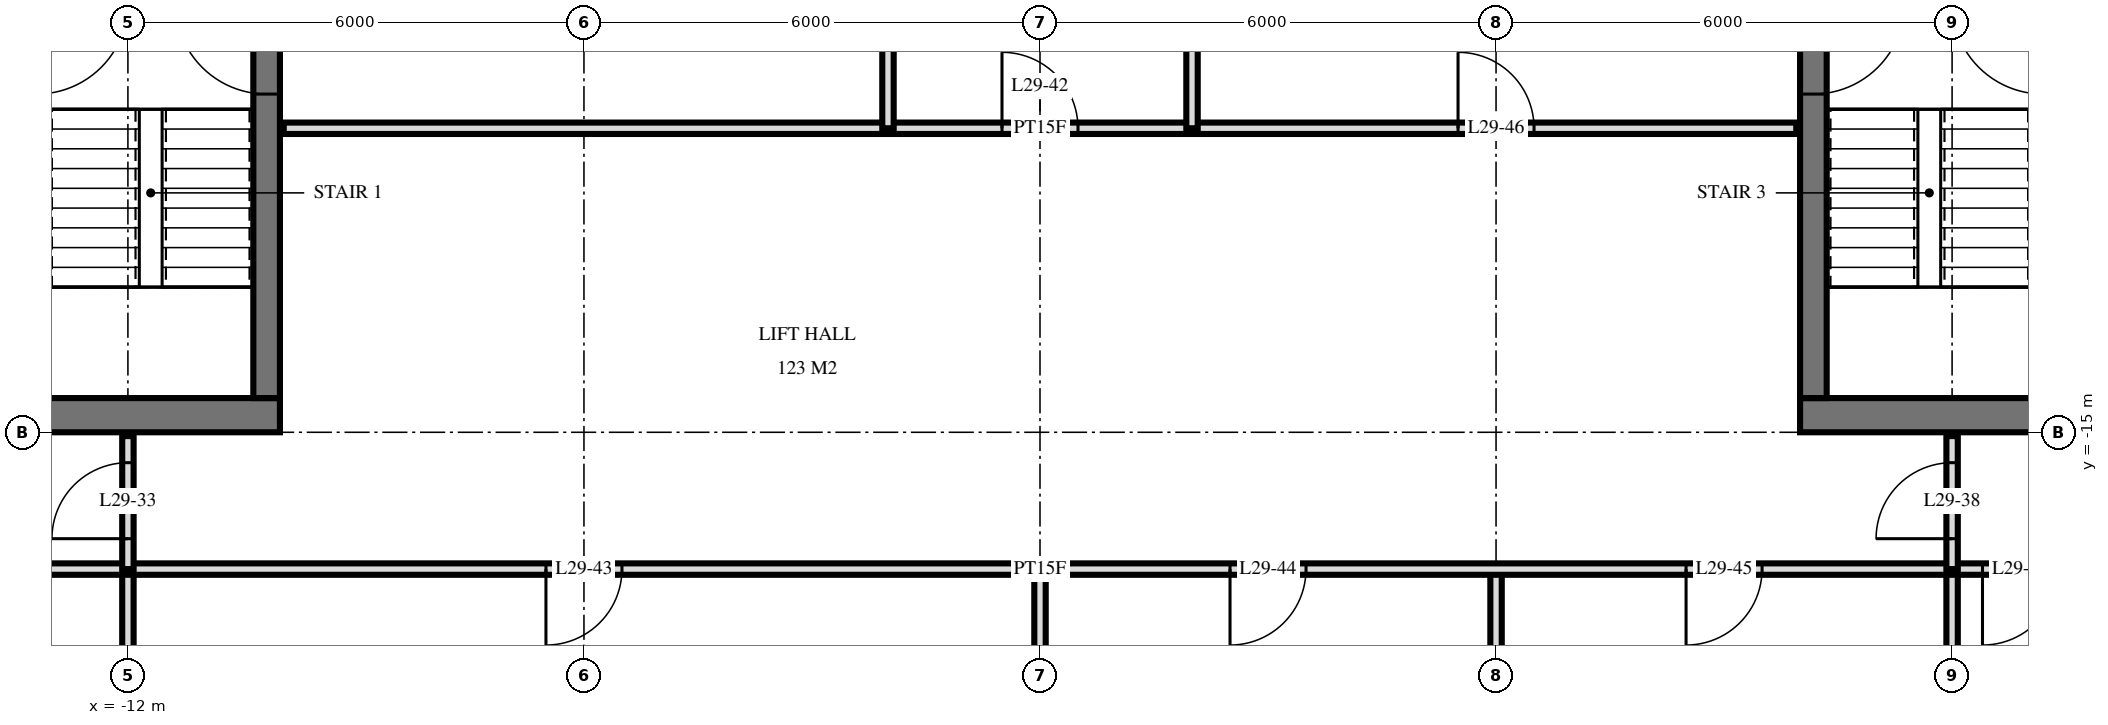
"""IFC4 building model, lengths in metres.
Left out: names, types, materials, properties, quantities, classifications, styles, units other than length and angle.
Written with IfcOpenShell. Run it as: python <this file> out.ifc"""

import sys

from ifc_helpers import new_model, si_unit, direction, frame, frame_2d, origin, place, context, subcontext, project, spatial, rectangle, extrude, element, fill, save


model = new_model("IFC4")
c1 = context("Model", 3, precision=1e-05, world=origin(), true_north=direction((0.0, 1.0)))
c2 = subcontext(c1, "Body", "Model", "MODEL_VIEW")
j1 = project(units=[si_unit("LENGTHUNIT", "METRE"), si_unit("PLANEANGLEUNIT", "RADIAN")], contexts=[c1])
p1 = place(None, origin())
s1 = spatial("IfcSite", under=j1, at=p1, CompositionType="ELEMENT")
p2 = place(p1, origin())
s2 = spatial("IfcBuilding", under=s1, at=p2, CompositionType="ELEMENT")
p3 = place(p2, frame((0.0, 0.0, 116.4)))
s3 = spatial("IfcBuildingStorey", under=s2, at=p3, CompositionType="ELEMENT", Elevation=116.4)
p4 = place(p3, frame((-24.5, -14.775, 0.0), z_axis=(0.0, 0.0, 1.0), x_axis=(1.0, 0.0, 0.0)))
e1 = element("IfcWall", 1, at=p4, inside=s3, PredefinedType="SHEAR", context=c2, shape_type="SweptSolid", body=[
    extrude(rectangle(XDim=14.5, YDim=0.45, at=frame_2d((7.25, 0.0))), origin(), (0.0, 0.0, 1.0), 3.6),
])
p5 = place(p4, frame((6.2, 0.0, 0.0)))
e2 = element("IfcOpeningElement", 2, at=p5, cuts=e1, PredefinedType="OPENING", context=c2, shape_type="SweptSolid", body=[
    extrude(rectangle(XDim=1.2, YDim=2.1, at=frame_2d((0.6, 1.05))), frame((0.0, 0.235, 0.0), z_axis=(0.0, -1.0, 0.0), x_axis=(1.0, 0.0, 0.0)), (0.0, 0.0, 1.0), 0.47),
])
p6 = place(p4, frame((9.25, 0.0, 0.0)))
e3 = element("IfcOpeningElement", 3, at=p6, cuts=e1, PredefinedType="OPENING", context=c2, shape_type="SweptSolid", body=[
    extrude(rectangle(XDim=1.1, YDim=2.1, at=frame_2d((0.55, 1.05))), frame((0.0, 0.235, 0.0), z_axis=(0.0, -1.0, 0.0), x_axis=(1.0, 0.0, 0.0)), (0.0, 0.0, 1.0), 0.47),
])
p7 = place(p4, frame((3.5, 0.0, 0.0)))
e4 = element("IfcOpeningElement", 4, at=p7, cuts=e1, PredefinedType="OPENING", context=c2, shape_type="SweptSolid", body=[
    extrude(rectangle(XDim=0.9, YDim=2.1, at=frame_2d((0.45, 1.05))), frame((0.0, 0.235, 0.0), z_axis=(0.0, -1.0, 0.0), x_axis=(1.0, 0.0, 0.0)), (0.0, 0.0, 1.0), 0.47),
])
p8 = place(p4, frame((1.05, 0.0, 0.0)))
e5 = element("IfcOpeningElement", 5, at=p8, cuts=e1, PredefinedType="OPENING", context=c2, shape_type="SweptSolid", body=[
    extrude(rectangle(XDim=1.0, YDim=2.1, at=frame_2d((0.5, 1.05))), frame((0.0, 0.235, 0.0), z_axis=(0.0, -1.0, 0.0), x_axis=(1.0, 0.0, 0.0)), (0.0, 0.0, 1.0), 0.47),
])
p9 = place(p3, frame((-10.175, -14.55, 0.0), z_axis=(0.0, 0.0, 1.0), x_axis=(0.0, 1.0, 0.0)))
e6 = element("IfcWall", 6, at=p9, inside=s3, PredefinedType="SHEAR", context=c2, shape_type="SweptSolid", body=[
    extrude(rectangle(XDim=14.1, YDim=0.35, at=frame_2d((7.05, 0.0))), origin(), (0.0, 0.0, 1.0), 3.6),
])
p10 = place(p9, frame((8.4, 0.0, 0.0)))
e7 = element("IfcOpeningElement", 7, at=p10, cuts=e6, PredefinedType="OPENING", context=c2, shape_type="SweptSolid", body=[
    extrude(rectangle(XDim=1.4, YDim=2.4, at=frame_2d((0.7, 1.2))), frame((0.0, 0.185, 0.0), z_axis=(0.0, -1.0, 0.0), x_axis=(1.0, 0.0, 0.0)), (0.0, 0.0, 1.0), 0.37),
])
p11 = place(p9, frame((10.0, 0.0, 0.0)))
e8 = element("IfcOpeningElement", 8, at=p11, cuts=e6, PredefinedType="OPENING", context=c2, shape_type="SweptSolid", body=[
    extrude(rectangle(XDim=1.4, YDim=2.4, at=frame_2d((0.7, 1.2))), frame((0.0, 0.185, 0.0), z_axis=(0.0, -1.0, 0.0), x_axis=(1.0, 0.0, 0.0)), (0.0, 0.0, 1.0), 0.37),
])
p12 = place(p9, frame((4.0, 0.0, 0.0)))
e9 = element("IfcOpeningElement", 9, at=p12, cuts=e6, PredefinedType="OPENING", context=c2, shape_type="SweptSolid", body=[
    extrude(rectangle(XDim=1.2, YDim=2.1, at=frame_2d((0.6, 1.05))), frame((0.0, 0.185, 0.0), z_axis=(0.0, -1.0, 0.0), x_axis=(1.0, 0.0, 0.0)), (0.0, 0.0, 1.0), 0.37),
])
p13 = place(p3, frame((10.0, -14.775, 0.0), z_axis=(0.0, 0.0, 1.0), x_axis=(1.0, 0.0, 0.0)))
e10 = element("IfcWall", 10, at=p13, inside=s3, PredefinedType="SHEAR", context=c2, shape_type="SweptSolid", body=[
    extrude(rectangle(XDim=14.5, YDim=0.45, at=frame_2d((7.25, 0.0))), origin(), (0.0, 0.0, 1.0), 3.6),
])
p14 = place(p13, frame((7.1, 0.0, 0.0)))
e11 = element("IfcOpeningElement", 11, at=p14, cuts=e10, PredefinedType="OPENING", context=c2, shape_type="SweptSolid", body=[
    extrude(rectangle(XDim=1.2, YDim=2.1, at=frame_2d((0.6, 1.05))), frame((0.0, 0.235, 0.0), z_axis=(0.0, -1.0, 0.0), x_axis=(1.0, 0.0, 0.0)), (0.0, 0.0, 1.0), 0.47),
])
p15 = place(p13, frame((4.15, 0.0, 0.0)))
e12 = element("IfcOpeningElement", 12, at=p15, cuts=e10, PredefinedType="OPENING", context=c2, shape_type="SweptSolid", body=[
    extrude(rectangle(XDim=1.1, YDim=2.1, at=frame_2d((0.55, 1.05))), frame((0.0, 0.235, 0.0), z_axis=(0.0, -1.0, 0.0), x_axis=(1.0, 0.0, 0.0)), (0.0, 0.0, 1.0), 0.47),
])
p16 = place(p13, frame((10.1, 0.0, 0.0)))
e13 = element("IfcOpeningElement", 13, at=p16, cuts=e10, PredefinedType="OPENING", context=c2, shape_type="SweptSolid", body=[
    extrude(rectangle(XDim=0.9, YDim=2.1, at=frame_2d((0.45, 1.05))), frame((0.0, 0.235, 0.0), z_axis=(0.0, -1.0, 0.0), x_axis=(1.0, 0.0, 0.0)), (0.0, 0.0, 1.0), 0.47),
])
p17 = place(p13, frame((12.45, 0.0, 0.0)))
e14 = element("IfcOpeningElement", 14, at=p17, cuts=e10, PredefinedType="OPENING", context=c2, shape_type="SweptSolid", body=[
    extrude(rectangle(XDim=1.0, YDim=2.1, at=frame_2d((0.5, 1.05))), frame((0.0, 0.235, 0.0), z_axis=(0.0, -1.0, 0.0), x_axis=(1.0, 0.0, 0.0)), (0.0, 0.0, 1.0), 0.47),
])
p18 = place(p3, frame((10.175, -14.55, 0.0), z_axis=(0.0, 0.0, 1.0), x_axis=(0.0, 1.0, 0.0)))
e15 = element("IfcWall", 15, at=p18, inside=s3, PredefinedType="SHEAR", context=c2, shape_type="SweptSolid", body=[
    extrude(rectangle(XDim=14.1, YDim=0.35, at=frame_2d((7.05, 0.0))), origin(), (0.0, 0.0, 1.0), 3.6),
])
p19 = place(p18, frame((8.4, 0.0, 0.0)))
e16 = element("IfcOpeningElement", 16, at=p19, cuts=e15, PredefinedType="OPENING", context=c2, shape_type="SweptSolid", body=[
    extrude(rectangle(XDim=1.4, YDim=2.4, at=frame_2d((0.7, 1.2))), frame((0.0, 0.185, 0.0), z_axis=(0.0, -1.0, 0.0), x_axis=(1.0, 0.0, 0.0)), (0.0, 0.0, 1.0), 0.37),
])
p20 = place(p18, frame((10.0, 0.0, 0.0)))
e17 = element("IfcOpeningElement", 17, at=p20, cuts=e15, PredefinedType="OPENING", context=c2, shape_type="SweptSolid", body=[
    extrude(rectangle(XDim=1.4, YDim=2.4, at=frame_2d((0.7, 1.2))), frame((0.0, 0.185, 0.0), z_axis=(0.0, -1.0, 0.0), x_axis=(1.0, 0.0, 0.0)), (0.0, 0.0, 1.0), 0.37),
])
p21 = place(p18, frame((4.0, 0.0, 0.0)))
e18 = element("IfcOpeningElement", 18, at=p21, cuts=e15, PredefinedType="OPENING", context=c2, shape_type="SweptSolid", body=[
    extrude(rectangle(XDim=1.2, YDim=2.1, at=frame_2d((0.6, 1.05))), frame((0.0, 0.185, 0.0), z_axis=(0.0, -1.0, 0.0), x_axis=(1.0, 0.0, 0.0)), (0.0, 0.0, 1.0), 0.37),
])
p22 = place(p3, frame((12.0, -16.8, 0.0), z_axis=(0.0, 0.0, 1.0), x_axis=(0.0, 1.0, 0.0)))
e19 = element("IfcWall", 19, at=p22, inside=s3, PredefinedType="PARTITIONING", context=c2, shape_type="SweptSolid", body=[
    extrude(rectangle(XDim=1.75, YDim=0.15, at=frame_2d((0.875, 0.0))), origin(), (0.0, 0.0, 1.0), 3.32),
])
p23 = place(p22, frame((0.4, 0.0, 0.0)))
e20 = element("IfcOpeningElement", 20, at=p23, cuts=e19, PredefinedType="OPENING", context=c2, shape_type="SweptSolid", body=[
    extrude(rectangle(XDim=1.0, YDim=2.1, at=frame_2d((0.5, 1.05))), frame((0.0, 0.085, 0.0), z_axis=(0.0, -1.0, 0.0), x_axis=(1.0, 0.0, 0.0)), (0.0, 0.0, 1.0), 0.17),
])
for number, where, z_axis, x_axis in (
    (21, (12.0, -33.62, 0.0), (0.0, 0.0, 1.0), (0.0, 1.0, 0.0)),
    (22, (6.0, -33.62, 0.0), (0.0, 0.0, 1.0), (0.0, 1.0, 0.0)),
):
    element("IfcWall", number, at=place(p3, frame(where, z_axis=z_axis, x_axis=x_axis)), inside=s3, PredefinedType="PARTITIONING", context=c2, shape_type="SweptSolid", body=[
        extrude(rectangle(XDim=16.82, YDim=0.15, at=frame_2d((8.41, 0.0))), origin(), (0.0, 0.0, 1.0), 3.32),
    ])
p24 = place(p3, frame((2.0, -11.0, 0.0), z_axis=(0.0, 0.0, 1.0), x_axis=(0.0, 1.0, 0.0)))
e23 = element("IfcWall", 23, at=p24, inside=s3, PredefinedType="PARTITIONING", context=c2, shape_type="SweptSolid", body=[
    extrude(rectangle(XDim=4.0, YDim=0.15, at=frame_2d((2.0, 0.0))), origin(), (0.0, 0.0, 1.0), 3.32),
])
p25 = place(p3, frame((0.0, -33.62, 0.0), z_axis=(0.0, 0.0, 1.0), x_axis=(0.0, 1.0, 0.0)))
e24 = element("IfcWall", 24, at=p25, inside=s3, PredefinedType="PARTITIONING", context=c2, shape_type="SweptSolid", body=[
    extrude(rectangle(XDim=16.82, YDim=0.15, at=frame_2d((8.41, 0.0))), origin(), (0.0, 0.0, 1.0), 3.32),
])
p26 = place(p3, frame((-2.0, -11.0, 0.0), z_axis=(0.0, 0.0, 1.0), x_axis=(0.0, 1.0, 0.0)))
e25 = element("IfcWall", 25, at=p26, inside=s3, PredefinedType="PARTITIONING", context=c2, shape_type="SweptSolid", body=[
    extrude(rectangle(XDim=4.0, YDim=0.15, at=frame_2d((2.0, 0.0))), origin(), (0.0, 0.0, 1.0), 3.32),
])
p27 = place(p3, frame((-12.0, -16.8, 0.0), z_axis=(0.0, 0.0, 1.0), x_axis=(0.0, 1.0, 0.0)))
e26 = element("IfcWall", 26, at=p27, inside=s3, PredefinedType="PARTITIONING", context=c2, shape_type="SweptSolid", body=[
    extrude(rectangle(XDim=1.75, YDim=0.15, at=frame_2d((0.875, 0.0))), origin(), (0.0, 0.0, 1.0), 3.32),
])
p28 = place(p27, frame((0.4, 0.0, 0.0)))
e27 = element("IfcOpeningElement", 27, at=p28, cuts=e26, PredefinedType="OPENING", context=c2, shape_type="SweptSolid", body=[
    extrude(rectangle(XDim=1.0, YDim=2.1, at=frame_2d((0.5, 1.05))), frame((0.0, 0.085, 0.0), z_axis=(0.0, -1.0, 0.0), x_axis=(1.0, 0.0, 0.0)), (0.0, 0.0, 1.0), 0.17),
])
p29 = place(p3, frame((-12.0, -33.62, 0.0), z_axis=(0.0, 0.0, 1.0), x_axis=(0.0, 1.0, 0.0)))
e28 = element("IfcWall", 28, at=p29, inside=s3, PredefinedType="PARTITIONING", context=c2, shape_type="SweptSolid", body=[
    extrude(rectangle(XDim=16.82, YDim=0.15, at=frame_2d((8.41, 0.0))), origin(), (0.0, 0.0, 1.0), 3.32),
])
p30 = place(p3, frame((-28.02, -16.8, 0.0), z_axis=(0.0, 0.0, 1.0), x_axis=(1.0, 0.0, 0.0)))
e29 = element("IfcWall", 29, at=p30, inside=s3, PredefinedType="PARTITIONING", context=c2, shape_type="SweptSolid", body=[
    extrude(rectangle(XDim=56.04, YDim=0.15, at=frame_2d((28.02, 0.0))), origin(), (0.0, 0.0, 1.0), 3.32),
])
p31 = place(p30, frame((13.17, 0.0, 0.0)))
e30 = element("IfcOpeningElement", 30, at=p31, cuts=e29, PredefinedType="OPENING", context=c2, shape_type="SweptSolid", body=[
    extrude(rectangle(XDim=1.0, YDim=2.1, at=frame_2d((0.5, 1.05))), frame((0.0, 0.085, 0.0), z_axis=(0.0, -1.0, 0.0), x_axis=(1.0, 0.0, 0.0)), (0.0, 0.0, 1.0), 0.17),
])
p32 = place(p30, frame((11.87, 0.0, 0.0)))
e31 = element("IfcOpeningElement", 31, at=p32, cuts=e29, PredefinedType="OPENING", context=c2, shape_type="SweptSolid", body=[
    extrude(rectangle(XDim=1.0, YDim=2.1, at=frame_2d((0.5, 1.05))), frame((0.0, 0.085, 0.0), z_axis=(0.0, -1.0, 0.0), x_axis=(1.0, 0.0, 0.0)), (0.0, 0.0, 1.0), 0.17),
])
p33 = place(p30, frame((8.32, 0.0, 0.0)))
e32 = element("IfcOpeningElement", 32, at=p33, cuts=e29, PredefinedType="OPENING", context=c2, shape_type="SweptSolid", body=[
    extrude(rectangle(XDim=1.0, YDim=2.1, at=frame_2d((0.5, 1.05))), frame((0.0, 0.085, 0.0), z_axis=(0.0, -1.0, 0.0), x_axis=(1.0, 0.0, 0.0)), (0.0, 0.0, 1.0), 0.17),
])
p34 = place(p30, frame((40.42, 0.0, 0.0)))
e33 = element("IfcOpeningElement", 33, at=p34, cuts=e29, PredefinedType="OPENING", context=c2, shape_type="SweptSolid", body=[
    extrude(rectangle(XDim=1.0, YDim=2.1, at=frame_2d((0.5, 1.05))), frame((0.0, 0.085, 0.0), z_axis=(0.0, -1.0, 0.0), x_axis=(1.0, 0.0, 0.0)), (0.0, 0.0, 1.0), 0.17),
])
p35 = place(p30, frame((46.72, 0.0, 0.0)))
e34 = element("IfcOpeningElement", 34, at=p35, cuts=e29, PredefinedType="OPENING", context=c2, shape_type="SweptSolid", body=[
    extrude(rectangle(XDim=1.0, YDim=2.1, at=frame_2d((0.5, 1.05))), frame((0.0, 0.085, 0.0), z_axis=(0.0, -1.0, 0.0), x_axis=(1.0, 0.0, 0.0)), (0.0, 0.0, 1.0), 0.17),
])
p36 = place(p30, frame((21.52, 0.0, 0.0)))
e35 = element("IfcOpeningElement", 35, at=p36, cuts=e29, PredefinedType="OPENING", context=c2, shape_type="SweptSolid", body=[
    extrude(rectangle(XDim=1.0, YDim=2.1, at=frame_2d((0.5, 1.05))), frame((0.0, 0.085, 0.0), z_axis=(0.0, -1.0, 0.0), x_axis=(1.0, 0.0, 0.0)), (0.0, 0.0, 1.0), 0.17),
])
p37 = place(p30, frame((30.52, 0.0, 0.0)))
e36 = element("IfcOpeningElement", 36, at=p37, cuts=e29, PredefinedType="OPENING", context=c2, shape_type="SweptSolid", body=[
    extrude(rectangle(XDim=1.0, YDim=2.1, at=frame_2d((0.5, 1.05))), frame((0.0, 0.085, 0.0), z_axis=(0.0, -1.0, 0.0), x_axis=(1.0, 0.0, 0.0)), (0.0, 0.0, 1.0), 0.17),
])
p38 = place(p30, frame((36.52, 0.0, 0.0)))
e37 = element("IfcOpeningElement", 37, at=p38, cuts=e29, PredefinedType="OPENING", context=c2, shape_type="SweptSolid", body=[
    extrude(rectangle(XDim=1.0, YDim=2.1, at=frame_2d((0.5, 1.05))), frame((0.0, 0.085, 0.0), z_axis=(0.0, -1.0, 0.0), x_axis=(1.0, 0.0, 0.0)), (0.0, 0.0, 1.0), 0.17),
])
p39 = place(p3, frame((-9.95, -11.0, 0.0), z_axis=(0.0, 0.0, 1.0), x_axis=(1.0, 0.0, 0.0)))
e38 = element("IfcWall", 38, at=p39, inside=s3, PredefinedType="PARTITIONING", context=c2, shape_type="SweptSolid", body=[
    extrude(rectangle(XDim=19.9, YDim=0.15, at=frame_2d((9.95, 0.0))), origin(), (0.0, 0.0, 1.0), 3.32),
])
p40 = place(p39, frame((9.45, 0.0, 0.0)))
e39 = element("IfcOpeningElement", 39, at=p40, cuts=e38, PredefinedType="OPENING", context=c2, shape_type="SweptSolid", body=[
    extrude(rectangle(XDim=1.0, YDim=2.1, at=frame_2d((0.5, 1.05))), frame((0.0, 0.085, 0.0), z_axis=(0.0, -1.0, 0.0), x_axis=(1.0, 0.0, 0.0)), (0.0, 0.0, 1.0), 0.17),
])
p41 = place(p39, frame((15.45, 0.0, 0.0)))
e40 = element("IfcOpeningElement", 40, at=p41, cuts=e38, PredefinedType="OPENING", context=c2, shape_type="SweptSolid", body=[
    extrude(rectangle(XDim=1.0, YDim=2.1, at=frame_2d((0.5, 1.05))), frame((0.0, 0.085, 0.0), z_axis=(0.0, -1.0, 0.0), x_axis=(1.0, 0.0, 0.0)), (0.0, 0.0, 1.0), 0.17),
])
p42 = place(p12, origin())
e41 = element("IfcDoor", 41, at=p42, inside=s3, OperationType="SINGLE_SWING_LEFT", PredefinedType="DOOR", context=c2, shape_type="SweptSolid", body=[
    extrude(rectangle(XDim=1.2, YDim=2.1, at=frame_2d((0.6, 1.05))), frame((0.0, 0.025, 0.0), z_axis=(0.0, -1.0, 0.0), x_axis=(1.0, 0.0, 0.0)), (0.0, 0.0, 1.0), 0.05),
])
fill(e9, e41)
p43 = place(p21, frame((0.6, 0.0, 0.0), z_axis=(0.0, 0.0, 1.0), x_axis=(-1.0, 0.0, 0.0)))
e42 = element("IfcDoor", 42, at=p43, inside=s3, OperationType="SINGLE_SWING_RIGHT", PredefinedType="DOOR", context=c2, shape_type="SweptSolid", body=[
    extrude(rectangle(XDim=1.2, YDim=2.1, at=frame_2d((0.0, 1.05))), frame((0.0, -0.025, 0.0), z_axis=(0.0, 1.0, 0.0), x_axis=(-1.0, 0.0, 0.0)), (0.0, 0.0, 1.0), 0.05),
])
fill(e18, e42)
p44 = place(p28, origin())
e43 = element("IfcDoor", 43, at=p44, inside=s3, OperationType="SINGLE_SWING_RIGHT", PredefinedType="DOOR", context=c2, shape_type="SweptSolid", body=[
    extrude(rectangle(XDim=1.0, YDim=2.1, at=frame_2d((0.5, 1.05))), frame((0.0, 0.025, 0.0), z_axis=(0.0, -1.0, 0.0), x_axis=(1.0, 0.0, 0.0)), (0.0, 0.0, 1.0), 0.05),
])
fill(e27, e43)
p45 = place(p23, origin())
e44 = element("IfcDoor", 44, at=p45, inside=s3, OperationType="SINGLE_SWING_RIGHT", PredefinedType="DOOR", context=c2, shape_type="SweptSolid", body=[
    extrude(rectangle(XDim=1.0, YDim=2.1, at=frame_2d((0.5, 1.05))), frame((0.0, 0.025, 0.0), z_axis=(0.0, -1.0, 0.0), x_axis=(1.0, 0.0, 0.0)), (0.0, 0.0, 1.0), 0.05),
])
fill(e20, e44)
p46 = place(p34, frame((0.5, 0.0, 0.0), z_axis=(0.0, 0.0, 1.0), x_axis=(-1.0, 0.0, 0.0)))
e45 = element("IfcDoor", 45, at=p46, inside=s3, OperationType="SINGLE_SWING_LEFT", PredefinedType="DOOR", context=c2, shape_type="SweptSolid", body=[
    extrude(rectangle(XDim=1.0, YDim=2.1, at=frame_2d((0.0, 1.05))), frame((0.0, -0.025, 0.0), z_axis=(0.0, 1.0, 0.0), x_axis=(-1.0, 0.0, 0.0)), (0.0, 0.0, 1.0), 0.05),
])
fill(e33, e45)
p47 = place(p40, origin())
e46 = element("IfcDoor", 46, at=p47, inside=s3, OperationType="SINGLE_SWING_RIGHT", PredefinedType="DOOR", context=c2, shape_type="SweptSolid", body=[
    extrude(rectangle(XDim=1.0, YDim=2.1, at=frame_2d((0.5, 1.05))), frame((0.0, 0.025, 0.0), z_axis=(0.0, -1.0, 0.0), x_axis=(1.0, 0.0, 0.0)), (0.0, 0.0, 1.0), 0.05),
])
fill(e39, e46)
p48 = place(p36, frame((0.5, 0.0, 0.0), z_axis=(0.0, 0.0, 1.0), x_axis=(-1.0, 0.0, 0.0)))
e47 = element("IfcDoor", 47, at=p48, inside=s3, OperationType="SINGLE_SWING_LEFT", PredefinedType="DOOR", context=c2, shape_type="SweptSolid", body=[
    extrude(rectangle(XDim=1.0, YDim=2.1, at=frame_2d((0.0, 1.05))), frame((0.0, -0.025, 0.0), z_axis=(0.0, 1.0, 0.0), x_axis=(-1.0, 0.0, 0.0)), (0.0, 0.0, 1.0), 0.05),
])
fill(e35, e47)
p49 = place(p37, frame((0.5, 0.0, 0.0), z_axis=(0.0, 0.0, 1.0), x_axis=(-1.0, 0.0, 0.0)))
e48 = element("IfcDoor", 48, at=p49, inside=s3, OperationType="SINGLE_SWING_LEFT", PredefinedType="DOOR", context=c2, shape_type="SweptSolid", body=[
    extrude(rectangle(XDim=1.0, YDim=2.1, at=frame_2d((0.0, 1.05))), frame((0.0, -0.025, 0.0), z_axis=(0.0, 1.0, 0.0), x_axis=(-1.0, 0.0, 0.0)), (0.0, 0.0, 1.0), 0.05),
])
fill(e36, e48)
p50 = place(p38, frame((0.5, 0.0, 0.0), z_axis=(0.0, 0.0, 1.0), x_axis=(-1.0, 0.0, 0.0)))
e49 = element("IfcDoor", 49, at=p50, inside=s3, OperationType="SINGLE_SWING_LEFT", PredefinedType="DOOR", context=c2, shape_type="SweptSolid", body=[
    extrude(rectangle(XDim=1.0, YDim=2.1, at=frame_2d((0.0, 1.05))), frame((0.0, -0.025, 0.0), z_axis=(0.0, 1.0, 0.0), x_axis=(-1.0, 0.0, 0.0)), (0.0, 0.0, 1.0), 0.05),
])
fill(e37, e49)
p51 = place(p41, origin())
e50 = element("IfcDoor", 50, at=p51, inside=s3, OperationType="SINGLE_SWING_RIGHT", PredefinedType="DOOR", context=c2, shape_type="SweptSolid", body=[
    extrude(rectangle(XDim=1.0, YDim=2.1, at=frame_2d((0.5, 1.05))), frame((0.0, 0.025, 0.0), z_axis=(0.0, -1.0, 0.0), x_axis=(1.0, 0.0, 0.0)), (0.0, 0.0, 1.0), 0.05),
])
fill(e40, e50)
save(model, sys.argv[1])
